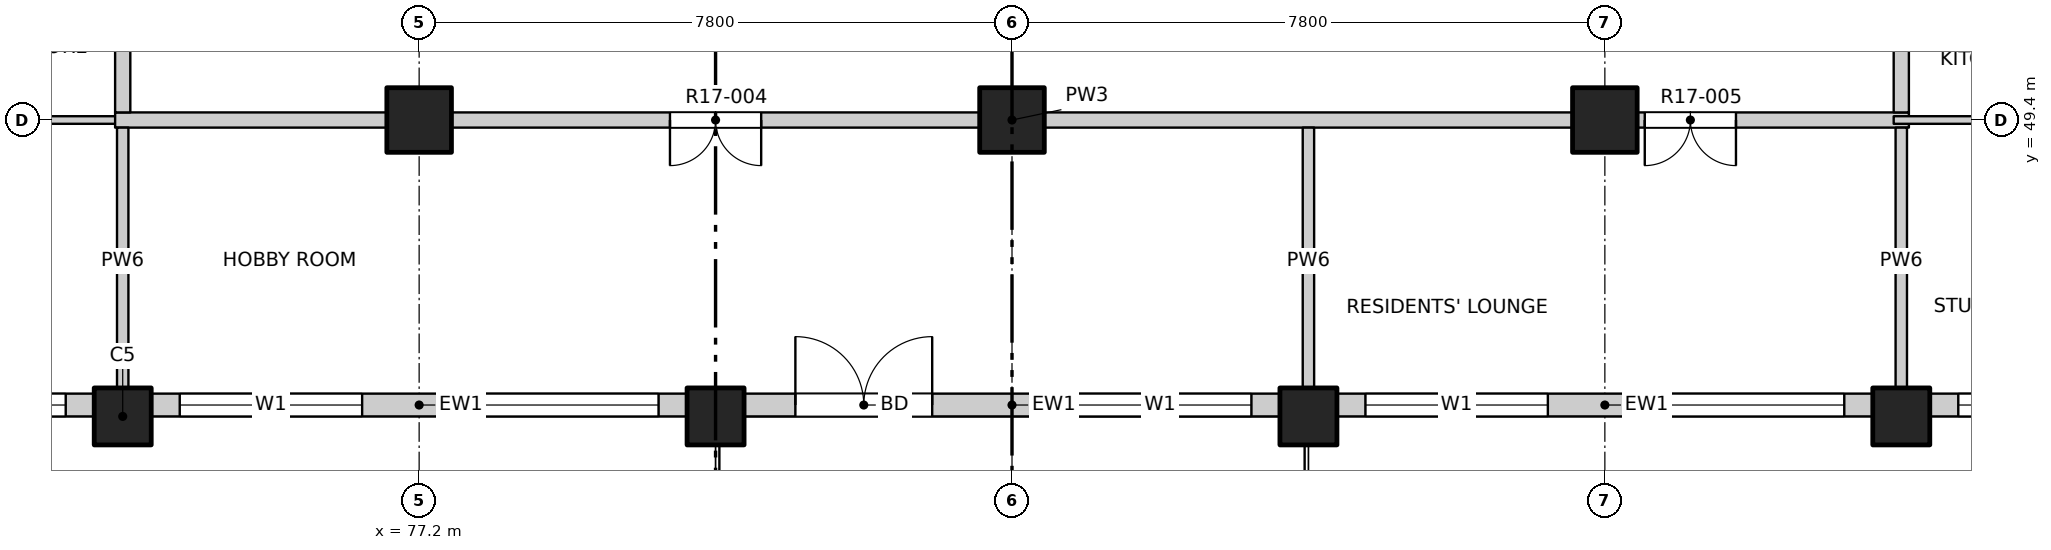
"""IFC4 building model, lengths in metres.
Left out: names, types, materials, properties, quantities, classifications, styles, units other than length and angle.
Written with IfcOpenShell. Run it as: python <this file> out.ifc"""

import sys

from ifc_helpers import new_model, si_unit, direction, frame, frame_2d, origin, origin_2d, place, context, subcontext, project, spatial, rectangle, extrude, element, fill, save


model = new_model("IFC4")
c1 = context("Model", 3, precision=1e-05, world=origin(), true_north=direction((0.0, 1.0)))
c2 = subcontext(c1, "Body", "Model", "MODEL_VIEW")
j1 = project(units=[si_unit("LENGTHUNIT", "METRE"), si_unit("PLANEANGLEUNIT", "RADIAN")], contexts=[c1])
p1 = place(None, origin())
s1 = spatial("IfcSite", under=j1, at=p1, CompositionType="ELEMENT")
p2 = place(p1, origin())
s2 = spatial("IfcBuilding", under=s1, at=p2, CompositionType="ELEMENT")
p3 = place(p2, frame((0.0, 0.0, 179.2)))
s3 = spatial("IfcBuildingStorey", under=s2, at=p3, CompositionType="ELEMENT", Elevation=179.2)
for number, where, z_axis, x_axis in (
    (1, (73.3, 45.5, -0.3), (0.0, 0.0, 1.0), (1.0, 0.0, 0.0)),
    (2, (81.1, 45.5, -0.3), (0.0, 0.0, 1.0), (1.0, 0.0, 0.0)),
    (3, (88.9, 45.5, -0.3), (0.0, 0.0, 1.0), (1.0, 0.0, 0.0)),
    (4, (96.7, 45.5, -0.3), (0.0, 0.0, 1.0), (1.0, 0.0, 0.0)),
):
    element("IfcColumn", number, at=place(p3, frame(where, z_axis=z_axis, x_axis=x_axis)), inside=s3, PredefinedType="COLUMN", context=c2, shape_type="SweptSolid", body=[
        extrude(rectangle(XDim=0.75, YDim=0.75, at=origin_2d()), origin(), (0.0, 0.0, 1.0), 3.45),
    ])
for number, where, z_axis, x_axis in (
    (5, (77.2, 49.4, -0.3), (0.0, 0.0, 1.0), (1.0, 0.0, 0.0)),
    (6, (85.0, 49.4, -0.3), (0.0, 0.0, 1.0), (1.0, 0.0, 0.0)),
    (7, (92.8, 49.4, -0.3), (0.0, 0.0, 1.0), (1.0, 0.0, 0.0)),
):
    element("IfcColumn", number, at=place(p3, frame(where, z_axis=z_axis, x_axis=x_axis)), inside=s3, PredefinedType="COLUMN", context=c2, shape_type="SweptSolid", body=[
        extrude(rectangle(XDim=0.85, YDim=0.85, at=origin_2d()), origin(), (0.0, 0.0, 1.0), 3.45),
    ])
p4 = place(p3, frame((69.4, 45.65, 0.0), z_axis=(0.0, 0.0, 1.0), x_axis=(1.0, 0.0, 0.0)))
e8 = element("IfcWall", 8, at=p4, inside=s3, PredefinedType="SOLIDWALL", context=c2, shape_type="SweptSolid", body=[
    extrude(rectangle(XDim=3.525, YDim=0.3, at=frame_2d((1.763, 0.0))), origin(), (0.0, 0.0, 1.0), 2.7),
])
p5 = place(p4, frame((0.75, 0.0, 0.9)))
e9 = element("IfcOpeningElement", 9, at=p5, cuts=e8, PredefinedType="OPENING", context=c2, shape_type="SweptSolid", body=[
    extrude(rectangle(XDim=2.4, YDim=1.8, at=frame_2d((1.2, 0.9))), frame((0.0, 0.16, 0.0), z_axis=(0.0, -1.0, 0.0), x_axis=(1.0, 0.0, 0.0)), (0.0, 0.0, 1.0), 0.32),
])
p6 = place(p3, frame((73.675, 45.65, 0.0), z_axis=(0.0, 0.0, 1.0), x_axis=(1.0, 0.0, 0.0)))
e10 = element("IfcWall", 10, at=p6, inside=s3, PredefinedType="SOLIDWALL", context=c2, shape_type="SweptSolid", body=[
    extrude(rectangle(XDim=7.05, YDim=0.3, at=frame_2d((3.525, 0.0))), origin(), (0.0, 0.0, 1.0), 2.7),
])
p7 = place(p6, frame((0.375, 0.0, 0.9)))
e11 = element("IfcOpeningElement", 11, at=p7, cuts=e10, PredefinedType="OPENING", context=c2, shape_type="SweptSolid", body=[
    extrude(rectangle(XDim=2.4, YDim=1.8, at=frame_2d((1.2, 0.9))), frame((0.0, 0.16, 0.0), z_axis=(0.0, -1.0, 0.0), x_axis=(1.0, 0.0, 0.0)), (0.0, 0.0, 1.0), 0.32),
])
p8 = place(p6, frame((4.275, 0.0, 0.9)))
e12 = element("IfcOpeningElement", 12, at=p8, cuts=e10, PredefinedType="OPENING", context=c2, shape_type="SweptSolid", body=[
    extrude(rectangle(XDim=2.4, YDim=1.8, at=frame_2d((1.2, 0.9))), frame((0.0, 0.16, 0.0), z_axis=(0.0, -1.0, 0.0), x_axis=(1.0, 0.0, 0.0)), (0.0, 0.0, 1.0), 0.32),
])
p9 = place(p3, frame((81.475, 45.65, 0.0), z_axis=(0.0, 0.0, 1.0), x_axis=(1.0, 0.0, 0.0)))
e13 = element("IfcWall", 13, at=p9, inside=s3, PredefinedType="SOLIDWALL", context=c2, shape_type="SweptSolid", body=[
    extrude(rectangle(XDim=7.05, YDim=0.3, at=frame_2d((3.525, 0.0))), origin(), (0.0, 0.0, 1.0), 2.7),
])
p10 = place(p9, frame((0.675, 0.0, 0.0)))
e14 = element("IfcOpeningElement", 14, at=p10, cuts=e13, PredefinedType="OPENING", context=c2, shape_type="SweptSolid", body=[
    extrude(rectangle(XDim=1.8, YDim=2.4, at=frame_2d((0.9, 1.2))), frame((0.0, 0.16, 0.0), z_axis=(0.0, -1.0, 0.0), x_axis=(1.0, 0.0, 0.0)), (0.0, 0.0, 1.0), 0.32),
])
p11 = place(p9, frame((4.275, 0.0, 0.9)))
e15 = element("IfcOpeningElement", 15, at=p11, cuts=e13, PredefinedType="OPENING", context=c2, shape_type="SweptSolid", body=[
    extrude(rectangle(XDim=2.4, YDim=1.8, at=frame_2d((1.2, 0.9))), frame((0.0, 0.16, 0.0), z_axis=(0.0, -1.0, 0.0), x_axis=(1.0, 0.0, 0.0)), (0.0, 0.0, 1.0), 0.32),
])
p12 = place(p3, frame((89.275, 45.65, 0.0), z_axis=(0.0, 0.0, 1.0), x_axis=(1.0, 0.0, 0.0)))
e16 = element("IfcWall", 16, at=p12, inside=s3, PredefinedType="SOLIDWALL", context=c2, shape_type="SweptSolid", body=[
    extrude(rectangle(XDim=7.05, YDim=0.3, at=frame_2d((3.525, 0.0))), origin(), (0.0, 0.0, 1.0), 2.7),
])
p13 = place(p12, frame((0.375, 0.0, 0.9)))
e17 = element("IfcOpeningElement", 17, at=p13, cuts=e16, PredefinedType="OPENING", context=c2, shape_type="SweptSolid", body=[
    extrude(rectangle(XDim=2.4, YDim=1.8, at=frame_2d((1.2, 0.9))), frame((0.0, 0.16, 0.0), z_axis=(0.0, -1.0, 0.0), x_axis=(1.0, 0.0, 0.0)), (0.0, 0.0, 1.0), 0.32),
])
p14 = place(p12, frame((4.275, 0.0, 0.9)))
e18 = element("IfcOpeningElement", 18, at=p14, cuts=e16, PredefinedType="OPENING", context=c2, shape_type="SweptSolid", body=[
    extrude(rectangle(XDim=2.4, YDim=1.8, at=frame_2d((1.2, 0.9))), frame((0.0, 0.16, 0.0), z_axis=(0.0, -1.0, 0.0), x_axis=(1.0, 0.0, 0.0)), (0.0, 0.0, 1.0), 0.32),
])
p15 = place(p3, frame((97.075, 45.65, 0.0), z_axis=(0.0, 0.0, 1.0), x_axis=(1.0, 0.0, 0.0)))
e19 = element("IfcWall", 19, at=p15, inside=s3, PredefinedType="SOLIDWALL", context=c2, shape_type="SweptSolid", body=[
    extrude(rectangle(XDim=3.525, YDim=0.3, at=frame_2d((1.763, 0.0))), origin(), (0.0, 0.0, 1.0), 2.7),
])
p16 = place(p15, frame((0.375, 0.0, 0.9)))
e20 = element("IfcOpeningElement", 20, at=p16, cuts=e19, PredefinedType="OPENING", context=c2, shape_type="SweptSolid", body=[
    extrude(rectangle(XDim=2.4, YDim=1.8, at=frame_2d((1.2, 0.9))), frame((0.0, 0.16, 0.0), z_axis=(0.0, -1.0, 0.0), x_axis=(1.0, 0.0, 0.0)), (0.0, 0.0, 1.0), 0.32),
])
p17 = place(p3, frame((65.8, 49.4, 0.0), z_axis=(0.0, 0.0, 1.0), x_axis=(1.0, 0.0, 0.0)))
e21 = element("IfcWall", 21, at=p17, inside=s3, PredefinedType="PARTITIONING", context=c2, shape_type="SweptSolid", body=[
    extrude(rectangle(XDim=7.6, YDim=0.1, at=frame_2d((3.8, 0.0))), origin(), (0.0, 0.0, 1.0), 3.15),
])
p18 = place(p17, frame((4.14, 0.0, 0.0)))
e22 = element("IfcOpeningElement", 22, at=p18, cuts=e21, PredefinedType="OPENING", context=c2, shape_type="SweptSolid", body=[
    extrude(rectangle(XDim=0.9, YDim=2.1, at=frame_2d((0.45, 1.05))), frame((0.0, 0.06, 0.0), z_axis=(0.0, -1.0, 0.0), x_axis=(1.0, 0.0, 0.0)), (0.0, 0.0, 1.0), 0.12),
])
p19 = place(p3, frame((73.2, 49.4, 0.0), z_axis=(0.0, 0.0, 1.0), x_axis=(1.0, 0.0, 0.0)))
e23 = element("IfcWall", 23, at=p19, inside=s3, PredefinedType="PARTITIONING", context=c2, shape_type="SweptSolid", body=[
    extrude(rectangle(XDim=23.6, YDim=0.2, at=frame_2d((11.8, 0.0))), origin(), (0.0, 0.0, 1.0), 3.15),
])
p20 = place(p19, frame((7.3, 0.0, 0.0)))
e24 = element("IfcOpeningElement", 24, at=p20, cuts=e23, PredefinedType="OPENING", context=c2, shape_type="SweptSolid", body=[
    extrude(rectangle(XDim=1.2, YDim=2.1, at=frame_2d((0.6, 1.05))), frame((0.0, 0.11, 0.0), z_axis=(0.0, -1.0, 0.0), x_axis=(1.0, 0.0, 0.0)), (0.0, 0.0, 1.0), 0.22),
])
p21 = place(p19, frame((20.125, 0.0, 0.0)))
e25 = element("IfcOpeningElement", 25, at=p21, cuts=e23, PredefinedType="OPENING", context=c2, shape_type="SweptSolid", body=[
    extrude(rectangle(XDim=1.2, YDim=2.1, at=frame_2d((0.6, 1.05))), frame((0.0, 0.11, 0.0), z_axis=(0.0, -1.0, 0.0), x_axis=(1.0, 0.0, 0.0)), (0.0, 0.0, 1.0), 0.22),
])
p22 = place(p3, frame((96.6, 49.4, 0.0), z_axis=(0.0, 0.0, 1.0), x_axis=(1.0, 0.0, 0.0)))
e26 = element("IfcWall", 26, at=p22, inside=s3, PredefinedType="PARTITIONING", context=c2, shape_type="SweptSolid", body=[
    extrude(rectangle(XDim=7.6, YDim=0.1, at=frame_2d((3.8, 0.0))), origin(), (0.0, 0.0, 1.0), 3.15),
])
p23 = place(p22, frame((2.56, 0.0, 0.0)))
e27 = element("IfcOpeningElement", 27, at=p23, cuts=e26, PredefinedType="OPENING", context=c2, shape_type="SweptSolid", body=[
    extrude(rectangle(XDim=0.9, YDim=2.1, at=frame_2d((0.45, 1.05))), frame((0.0, 0.06, 0.0), z_axis=(0.0, -1.0, 0.0), x_axis=(1.0, 0.0, 0.0)), (0.0, 0.0, 1.0), 0.12),
])
p24 = place(p3, frame((73.3, 45.8, 0.0), z_axis=(0.0, 0.0, 1.0), x_axis=(0.0, 1.0, 0.0)))
e28 = element("IfcWall", 28, at=p24, inside=s3, PredefinedType="PARTITIONING", context=c2, shape_type="SweptSolid", body=[
    extrude(rectangle(XDim=3.5, YDim=0.15, at=frame_2d((1.75, 0.0))), origin(), (0.0, 0.0, 1.0), 3.15),
])
p25 = place(p3, frame((73.3, 49.5, 0.0), z_axis=(0.0, 0.0, 1.0), x_axis=(0.0, 1.0, 0.0)))
e29 = element("IfcWall", 29, at=p25, inside=s3, PredefinedType="PARTITIONING", context=c2, shape_type="SweptSolid", body=[
    extrude(rectangle(XDim=34.7, YDim=0.2, at=frame_2d((17.35, 0.0))), origin(), (0.0, 0.0, 1.0), 3.15),
])
p26 = place(p25, frame((10.575, 0.0, 0.0)))
e30 = element("IfcOpeningElement", 30, at=p26, cuts=e29, PredefinedType="OPENING", context=c2, shape_type="SweptSolid", body=[
    extrude(rectangle(XDim=1.0, YDim=2.1, at=frame_2d((0.5, 1.05))), frame((0.0, 0.11, 0.0), z_axis=(0.0, -1.0, 0.0), x_axis=(1.0, 0.0, 0.0)), (0.0, 0.0, 1.0), 0.22),
])
p27 = place(p25, frame((18.825, 0.0, 0.0)))
e31 = element("IfcOpeningElement", 31, at=p27, cuts=e29, PredefinedType="OPENING", context=c2, shape_type="SweptSolid", body=[
    extrude(rectangle(XDim=1.0, YDim=2.1, at=frame_2d((0.5, 1.05))), frame((0.0, 0.11, 0.0), z_axis=(0.0, -1.0, 0.0), x_axis=(1.0, 0.0, 0.0)), (0.0, 0.0, 1.0), 0.22),
])
p28 = place(p25, frame((29.075, 0.0, 0.0)))
e32 = element("IfcOpeningElement", 32, at=p28, cuts=e29, PredefinedType="OPENING", context=c2, shape_type="SweptSolid", body=[
    extrude(rectangle(XDim=1.0, YDim=2.1, at=frame_2d((0.5, 1.05))), frame((0.0, 0.11, 0.0), z_axis=(0.0, -1.0, 0.0), x_axis=(1.0, 0.0, 0.0)), (0.0, 0.0, 1.0), 0.22),
])
p29 = place(p3, frame((88.9, 45.8, 0.0), z_axis=(0.0, 0.0, 1.0), x_axis=(0.0, 1.0, 0.0)))
e33 = element("IfcWall", 33, at=p29, inside=s3, PredefinedType="PARTITIONING", context=c2, shape_type="SweptSolid", body=[
    extrude(rectangle(XDim=3.5, YDim=0.15, at=frame_2d((1.75, 0.0))), origin(), (0.0, 0.0, 1.0), 2.55),
])
p30 = place(p3, frame((96.7, 45.8, 0.0), z_axis=(0.0, 0.0, 1.0), x_axis=(0.0, 1.0, 0.0)))
e34 = element("IfcWall", 34, at=p30, inside=s3, PredefinedType="PARTITIONING", context=c2, shape_type="SweptSolid", body=[
    extrude(rectangle(XDim=3.5, YDim=0.15, at=frame_2d((1.75, 0.0))), origin(), (0.0, 0.0, 1.0), 3.15),
])
p31 = place(p3, frame((96.7, 49.5, 0.0), z_axis=(0.0, 0.0, 1.0), x_axis=(0.0, 1.0, 0.0)))
e35 = element("IfcWall", 35, at=p31, inside=s3, PredefinedType="PARTITIONING", context=c2, shape_type="SweptSolid", body=[
    extrude(rectangle(XDim=34.7, YDim=0.2, at=frame_2d((17.35, 0.0))), origin(), (0.0, 0.0, 1.0), 3.15),
])
p32 = place(p31, frame((6.875, 0.0, 0.0)))
e36 = element("IfcOpeningElement", 36, at=p32, cuts=e35, PredefinedType="OPENING", context=c2, shape_type="SweptSolid", body=[
    extrude(rectangle(XDim=1.0, YDim=2.1, at=frame_2d((0.5, 1.05))), frame((0.0, 0.11, 0.0), z_axis=(0.0, -1.0, 0.0), x_axis=(1.0, 0.0, 0.0)), (0.0, 0.0, 1.0), 0.22),
])
p33 = place(p31, frame((21.775, 0.0, 0.0)))
e37 = element("IfcOpeningElement", 37, at=p33, cuts=e35, PredefinedType="OPENING", context=c2, shape_type="SweptSolid", body=[
    extrude(rectangle(XDim=1.0, YDim=2.1, at=frame_2d((0.5, 1.05))), frame((0.0, 0.11, 0.0), z_axis=(0.0, -1.0, 0.0), x_axis=(1.0, 0.0, 0.0)), (0.0, 0.0, 1.0), 0.22),
])
p34 = place(p31, frame((27.725, 0.0, 0.0)))
e38 = element("IfcOpeningElement", 38, at=p34, cuts=e35, PredefinedType="OPENING", context=c2, shape_type="SweptSolid", body=[
    extrude(rectangle(XDim=1.0, YDim=2.1, at=frame_2d((0.5, 1.05))), frame((0.0, 0.11, 0.0), z_axis=(0.0, -1.0, 0.0), x_axis=(1.0, 0.0, 0.0)), (0.0, 0.0, 1.0), 0.22),
])
p35 = place(p5, origin())
e39 = element("IfcWindow", 39, at=p35, inside=s3, PartitioningType="DOUBLE_PANEL_VERTICAL", PredefinedType="WINDOW", context=c2, shape_type="SweptSolid", body=[
    extrude(rectangle(XDim=2.4, YDim=1.8, at=frame_2d((1.2, 0.9))), frame((0.0, 0.03, 0.0), z_axis=(0.0, -1.0, 0.0), x_axis=(1.0, 0.0, 0.0)), (0.0, 0.0, 1.0), 0.06),
])
fill(e9, e39)
p36 = place(p7, origin())
e40 = element("IfcWindow", 40, at=p36, inside=s3, PartitioningType="DOUBLE_PANEL_VERTICAL", PredefinedType="WINDOW", context=c2, shape_type="SweptSolid", body=[
    extrude(rectangle(XDim=2.4, YDim=1.8, at=frame_2d((1.2, 0.9))), frame((0.0, 0.03, 0.0), z_axis=(0.0, -1.0, 0.0), x_axis=(1.0, 0.0, 0.0)), (0.0, 0.0, 1.0), 0.06),
])
fill(e11, e40)
p37 = place(p8, origin())
e41 = element("IfcWindow", 41, at=p37, inside=s3, PartitioningType="DOUBLE_PANEL_VERTICAL", PredefinedType="WINDOW", context=c2, shape_type="SweptSolid", body=[
    extrude(rectangle(XDim=2.4, YDim=1.8, at=frame_2d((1.2, 0.9))), frame((0.0, 0.03, 0.0), z_axis=(0.0, -1.0, 0.0), x_axis=(1.0, 0.0, 0.0)), (0.0, 0.0, 1.0), 0.06),
])
fill(e12, e41)
p38 = place(p10, origin())
e42 = element("IfcDoor", 42, at=p38, inside=s3, OperationType="DOUBLE_DOOR_SINGLE_SWING", PredefinedType="DOOR", context=c2, shape_type="SweptSolid", body=[
    extrude(rectangle(XDim=1.8, YDim=2.4, at=frame_2d((0.9, 1.2))), frame((0.0, 0.025, 0.0), z_axis=(0.0, -1.0, 0.0), x_axis=(1.0, 0.0, 0.0)), (0.0, 0.0, 1.0), 0.05),
])
fill(e14, e42)
p39 = place(p11, origin())
e43 = element("IfcWindow", 43, at=p39, inside=s3, PartitioningType="DOUBLE_PANEL_VERTICAL", PredefinedType="WINDOW", context=c2, shape_type="SweptSolid", body=[
    extrude(rectangle(XDim=2.4, YDim=1.8, at=frame_2d((1.2, 0.9))), frame((0.0, 0.03, 0.0), z_axis=(0.0, -1.0, 0.0), x_axis=(1.0, 0.0, 0.0)), (0.0, 0.0, 1.0), 0.06),
])
fill(e15, e43)
p40 = place(p13, origin())
e44 = element("IfcWindow", 44, at=p40, inside=s3, PartitioningType="DOUBLE_PANEL_VERTICAL", PredefinedType="WINDOW", context=c2, shape_type="SweptSolid", body=[
    extrude(rectangle(XDim=2.4, YDim=1.8, at=frame_2d((1.2, 0.9))), frame((0.0, 0.03, 0.0), z_axis=(0.0, -1.0, 0.0), x_axis=(1.0, 0.0, 0.0)), (0.0, 0.0, 1.0), 0.06),
])
fill(e17, e44)
p41 = place(p14, origin())
e45 = element("IfcWindow", 45, at=p41, inside=s3, PartitioningType="DOUBLE_PANEL_VERTICAL", PredefinedType="WINDOW", context=c2, shape_type="SweptSolid", body=[
    extrude(rectangle(XDim=2.4, YDim=1.8, at=frame_2d((1.2, 0.9))), frame((0.0, 0.03, 0.0), z_axis=(0.0, -1.0, 0.0), x_axis=(1.0, 0.0, 0.0)), (0.0, 0.0, 1.0), 0.06),
])
fill(e18, e45)
p42 = place(p16, origin())
e46 = element("IfcWindow", 46, at=p42, inside=s3, PartitioningType="DOUBLE_PANEL_VERTICAL", PredefinedType="WINDOW", context=c2, shape_type="SweptSolid", body=[
    extrude(rectangle(XDim=2.4, YDim=1.8, at=frame_2d((1.2, 0.9))), frame((0.0, 0.03, 0.0), z_axis=(0.0, -1.0, 0.0), x_axis=(1.0, 0.0, 0.0)), (0.0, 0.0, 1.0), 0.06),
])
fill(e20, e46)
p43 = place(p20, origin())
e47 = element("IfcDoor", 47, at=p43, inside=s3, OperationType="DOUBLE_DOOR_SINGLE_SWING", PredefinedType="DOOR", context=c2, shape_type="SweptSolid", body=[
    extrude(rectangle(XDim=1.2, YDim=2.1, at=frame_2d((0.6, 1.05))), frame((0.0, 0.025, 0.0), z_axis=(0.0, -1.0, 0.0), x_axis=(1.0, 0.0, 0.0)), (0.0, 0.0, 1.0), 0.05),
])
fill(e24, e47)
p44 = place(p21, origin())
e48 = element("IfcDoor", 48, at=p44, inside=s3, OperationType="DOUBLE_DOOR_SINGLE_SWING", PredefinedType="DOOR", context=c2, shape_type="SweptSolid", body=[
    extrude(rectangle(XDim=1.2, YDim=2.1, at=frame_2d((0.6, 1.05))), frame((0.0, 0.025, 0.0), z_axis=(0.0, -1.0, 0.0), x_axis=(1.0, 0.0, 0.0)), (0.0, 0.0, 1.0), 0.05),
])
fill(e25, e48)
save(model, sys.argv[1])
